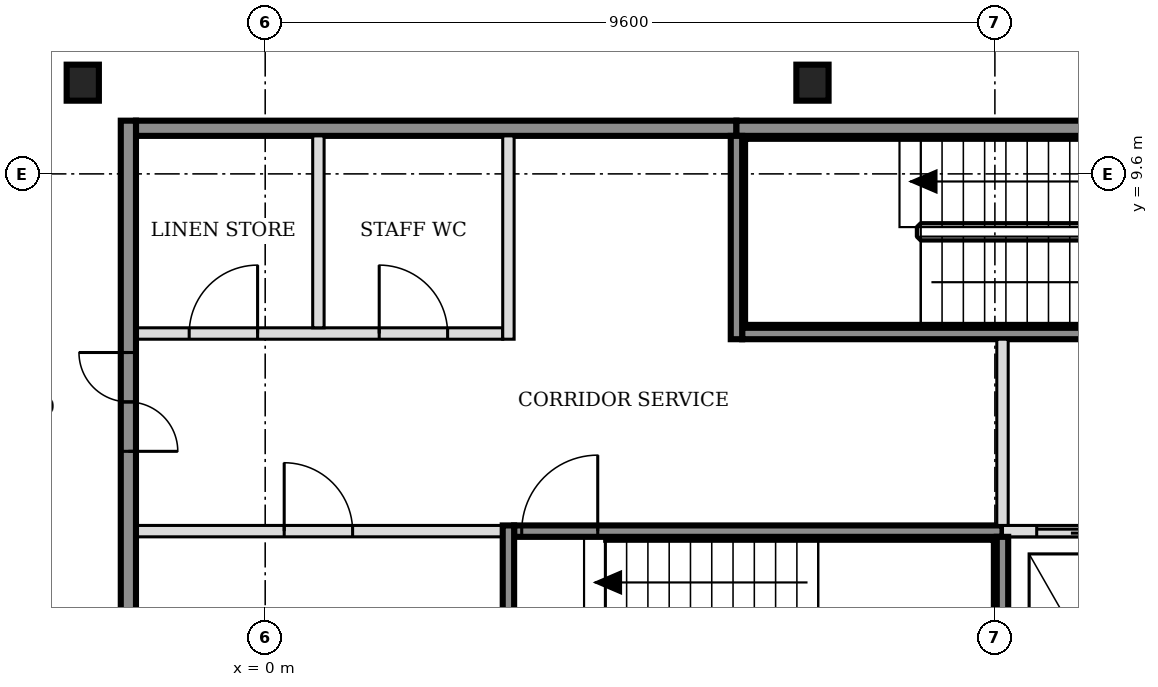
"""IFC4 building model, lengths in metres.
Left out: names, types, materials, properties, quantities, classifications, styles, units other than length and angle.
Written with IfcOpenShell. Run it as: python <this file> out.ifc"""

import sys

from ifc_helpers import new_model, si_unit, direction, frame, frame_2d, origin, origin_2d, place, context, subcontext, project, spatial, rectangle, i_section, extrude, element, fill, save


model = new_model("IFC4")
c1 = context("Model", 3, precision=1e-05, world=origin(), true_north=direction((0.0, 1.0)))
c2 = subcontext(c1, "Body", "Model", "MODEL_VIEW")
j1 = project(units=[si_unit("LENGTHUNIT", "METRE"), si_unit("PLANEANGLEUNIT", "RADIAN")], contexts=[c1])
p1 = place(None, origin())
s1 = spatial("IfcSite", under=j1, at=p1, CompositionType="ELEMENT")
p2 = place(p1, origin())
s2 = spatial("IfcBuilding", under=s1, at=p2, CompositionType="ELEMENT")
p3 = place(p2, frame((0.0, 0.0, 115.8)))
s3 = spatial("IfcBuildingStorey", under=s2, at=p3, CompositionType="ELEMENT", Elevation=115.8)
for number, where, z_axis, x_axis in (
    (1, (-2.4, 10.8, -0.15), (0.0, 0.0, 1.0), (1.0, 0.0, 0.0)),
    (2, (7.2, 10.8, -0.15), (0.0, 0.0, 1.0), (1.0, 0.0, 0.0)),
):
    element("IfcColumn", number, at=place(p3, frame(where, z_axis=z_axis, x_axis=x_axis)), inside=s3, PredefinedType="COLUMN", context=c2, shape_type="SweptSolid", body=[
        extrude(i_section(OverallWidth=0.424, OverallDepth=0.474, WebThickness=0.048, FlangeThickness=0.077, FilletRadius=0.015, at=origin_2d()), origin(), (0.0, 0.0, 1.0), 3.5),
    ])
p4 = place(p3, frame((-1.7, 4.9, 0.0), z_axis=(0.0, 0.0, 1.0), x_axis=(1.0, 0.0, 0.0)))
e3 = element("IfcWall", 3, at=p4, inside=s3, PredefinedType="PARTITIONING", context=c2, shape_type="SweptSolid", body=[
    extrude(rectangle(XDim=4.825, YDim=0.15, at=frame_2d((2.413, 0.0))), origin(), (0.0, 0.0, 1.0), 3.35),
])
p5 = place(p4, frame((1.95, 0.0, 0.0)))
e4 = element("IfcOpeningElement", 4, at=p5, cuts=e3, PredefinedType="OPENING", context=c2, shape_type="SweptSolid", body=[
    extrude(rectangle(XDim=0.9, YDim=2.1, at=frame_2d((0.45, 1.05))), frame((0.0, 0.085, 0.0), z_axis=(0.0, -1.0, 0.0), x_axis=(1.0, 0.0, 0.0)), (0.0, 0.0, 1.0), 0.17),
])
p6 = place(p3, frame((3.275, 4.9, 0.0), z_axis=(0.0, 0.0, 1.0), x_axis=(1.0, 0.0, 0.0)))
e5 = element("IfcWall", 5, at=p6, inside=s3, PredefinedType="SOLIDWALL", context=c2, shape_type="SweptSolid", body=[
    extrude(rectangle(XDim=6.425, YDim=0.15, at=frame_2d((3.212, 0.0))), origin(), (0.0, 0.0, 1.0), 3.35),
])
p7 = place(p6, frame((0.1, 0.0, 0.0)))
e6 = element("IfcOpeningElement", 6, at=p7, cuts=e5, PredefinedType="OPENING", context=c2, shape_type="SweptSolid", body=[
    extrude(rectangle(XDim=1.0, YDim=2.1, at=frame_2d((0.5, 1.05))), frame((0.0, 0.085, 0.0), z_axis=(0.0, -1.0, 0.0), x_axis=(1.0, 0.0, 0.0)), (0.0, 0.0, 1.0), 0.17),
])
p8 = place(p3, frame((9.7, 4.9, 0.0), z_axis=(0.0, 0.0, 1.0), x_axis=(1.0, 0.0, 0.0)))
e7 = element("IfcWall", 7, at=p8, inside=s3, PredefinedType="SOLIDWALL", context=c2, shape_type="SweptSolid", body=[
    extrude(rectangle(XDim=6.4, YDim=0.15, at=frame_2d((3.2, 0.0))), origin(), (0.0, 0.0, 1.0), 3.35),
])
p9 = place(p8, frame((0.45, 0.0, 0.0)))
e8 = element("IfcOpeningElement", 8, at=p9, cuts=e7, PredefinedType="OPENING", context=c2, shape_type="SweptSolid", body=[
    extrude(rectangle(XDim=1.0, YDim=2.1, at=frame_2d((0.5, 1.05))), frame((0.0, 0.085, 0.0), z_axis=(0.0, -1.0, 0.0), x_axis=(1.0, 0.0, 0.0)), (0.0, 0.0, 1.0), 0.17),
])
p10 = place(p8, frame((2.35, 0.0, 0.0)))
e9 = element("IfcOpeningElement", 9, at=p10, cuts=e7, PredefinedType="OPENING", context=c2, shape_type="SweptSolid", body=[
    extrude(rectangle(XDim=1.0, YDim=2.1, at=frame_2d((0.5, 1.05))), frame((0.0, 0.085, 0.0), z_axis=(0.0, -1.0, 0.0), x_axis=(1.0, 0.0, 0.0)), (0.0, 0.0, 1.0), 0.17),
])
p11 = place(p8, frame((4.7, 0.0, 0.0)))
e10 = element("IfcOpeningElement", 10, at=p11, cuts=e7, PredefinedType="OPENING", context=c2, shape_type="SweptSolid", body=[
    extrude(rectangle(XDim=0.9, YDim=2.1, at=frame_2d((0.45, 1.05))), frame((0.0, 0.085, 0.0), z_axis=(0.0, -1.0, 0.0), x_axis=(1.0, 0.0, 0.0)), (0.0, 0.0, 1.0), 0.17),
])
p12 = place(p3, frame((-1.7, 7.5, 0.0), z_axis=(0.0, 0.0, 1.0), x_axis=(1.0, 0.0, 0.0)))
e11 = element("IfcWall", 11, at=p12, inside=s3, PredefinedType="PARTITIONING", context=c2, shape_type="SweptSolid", body=[
    extrude(rectangle(XDim=4.825, YDim=0.15, at=frame_2d((2.413, 0.0))), origin(), (0.0, 0.0, 1.0), 3.35),
])
p13 = place(p12, frame((0.7, 0.0, 0.0)))
e12 = element("IfcOpeningElement", 12, at=p13, cuts=e11, PredefinedType="OPENING", context=c2, shape_type="SweptSolid", body=[
    extrude(rectangle(XDim=0.9, YDim=2.1, at=frame_2d((0.45, 1.05))), frame((0.0, 0.085, 0.0), z_axis=(0.0, -1.0, 0.0), x_axis=(1.0, 0.0, 0.0)), (0.0, 0.0, 1.0), 0.17),
])
p14 = place(p12, frame((3.2, 0.0, 0.0)))
e13 = element("IfcOpeningElement", 13, at=p14, cuts=e11, PredefinedType="OPENING", context=c2, shape_type="SweptSolid", body=[
    extrude(rectangle(XDim=0.9, YDim=2.1, at=frame_2d((0.45, 1.05))), frame((0.0, 0.085, 0.0), z_axis=(0.0, -1.0, 0.0), x_axis=(1.0, 0.0, 0.0)), (0.0, 0.0, 1.0), 0.17),
])
p15 = place(p3, frame((6.275, 7.5, 0.0), z_axis=(0.0, 0.0, 1.0), x_axis=(1.0, 0.0, 0.0)))
e14 = element("IfcWall", 14, at=p15, inside=s3, PredefinedType="SOLIDWALL", context=c2, shape_type="SweptSolid", body=[
    extrude(rectangle(XDim=6.425, YDim=0.15, at=frame_2d((3.212, 0.0))), origin(), (0.0, 0.0, 1.0), 3.35),
])
p16 = place(p15, frame((5.225, 0.0, 0.0)))
e15 = element("IfcOpeningElement", 15, at=p16, cuts=e14, PredefinedType="OPENING", context=c2, shape_type="SweptSolid", body=[
    extrude(rectangle(XDim=1.0, YDim=2.1, at=frame_2d((0.5, 1.05))), frame((0.0, 0.085, 0.0), z_axis=(0.0, -1.0, 0.0), x_axis=(1.0, 0.0, 0.0)), (0.0, 0.0, 1.0), 0.17),
])
p17 = place(p3, frame((-1.7, 10.2, 0.0), z_axis=(0.0, 0.0, 1.0), x_axis=(1.0, 0.0, 0.0)))
e16 = element("IfcWall", 16, at=p17, inside=s3, PredefinedType="SOLIDWALL", context=c2, shape_type="SweptSolid", body=[
    extrude(rectangle(XDim=7.9, YDim=0.2, at=frame_2d((3.95, 0.0))), origin(), (0.0, 0.0, 1.0), 3.35),
])
p18 = place(p3, frame((6.2, 10.2, 0.0), z_axis=(0.0, 0.0, 1.0), x_axis=(1.0, 0.0, 0.0)))
e17 = element("IfcWall", 17, at=p18, inside=s3, PredefinedType="SOLIDWALL", context=c2, shape_type="SweptSolid", body=[
    extrude(rectangle(XDim=6.5, YDim=0.2, at=frame_2d((3.25, 0.0))), origin(), (0.0, 0.0, 1.0), 3.35),
])
p19 = place(p3, frame((-1.8, -5.5, 0.0), z_axis=(0.0, 0.0, 1.0), x_axis=(0.0, 1.0, 0.0)))
e18 = element("IfcWall", 18, at=p19, inside=s3, PredefinedType="SOLIDWALL", context=c2, shape_type="SweptSolid", body=[
    extrude(rectangle(XDim=15.8, YDim=0.2, at=frame_2d((7.9, 0.0))), origin(), (0.0, 0.0, 1.0), 3.35),
])
p20 = place(p19, frame((3.05, 0.0, 0.0)))
e19 = element("IfcOpeningElement", 19, at=p20, cuts=e18, PredefinedType="OPENING", context=c2, shape_type="SweptSolid", body=[
    extrude(rectangle(XDim=1.3, YDim=2.1, at=frame_2d((0.65, 1.05))), frame((0.0, 0.11, 0.0), z_axis=(0.0, -1.0, 0.0), x_axis=(1.0, 0.0, 0.0)), (0.0, 0.0, 1.0), 0.22),
])
p21 = place(p19, frame((11.45, 0.0, 0.0)))
e20 = element("IfcOpeningElement", 20, at=p21, cuts=e18, PredefinedType="OPENING", context=c2, shape_type="SweptSolid", body=[
    extrude(rectangle(XDim=1.3, YDim=2.1, at=frame_2d((0.65, 1.05))), frame((0.0, 0.11, 0.0), z_axis=(0.0, -1.0, 0.0), x_axis=(1.0, 0.0, 0.0)), (0.0, 0.0, 1.0), 0.22),
])
p22 = place(p3, frame((0.7, 7.575, 0.0), z_axis=(0.0, 0.0, 1.0), x_axis=(0.0, 1.0, 0.0)))
e21 = element("IfcWall", 21, at=p22, inside=s3, PredefinedType="PARTITIONING", context=c2, shape_type="SweptSolid", body=[
    extrude(rectangle(XDim=2.525, YDim=0.15, at=frame_2d((1.263, 0.0))), origin(), (0.0, 0.0, 1.0), 3.35),
])
p23 = place(p3, frame((3.2, 2.275, 0.0), z_axis=(0.0, 0.0, 1.0), x_axis=(0.0, 1.0, 0.0)))
e22 = element("IfcWall", 22, at=p23, inside=s3, PredefinedType="SOLIDWALL", context=c2, shape_type="SweptSolid", body=[
    extrude(rectangle(XDim=2.7, YDim=0.15, at=frame_2d((1.35, 0.0))), origin(), (0.0, 0.0, 1.0), 3.35),
])
p24 = place(p3, frame((3.2, 7.425, 0.0), z_axis=(0.0, 0.0, 1.0), x_axis=(0.0, 1.0, 0.0)))
e23 = element("IfcWall", 23, at=p24, inside=s3, PredefinedType="PARTITIONING", context=c2, shape_type="SweptSolid", body=[
    extrude(rectangle(XDim=2.675, YDim=0.15, at=frame_2d((1.337, 0.0))), origin(), (0.0, 0.0, 1.0), 3.35),
])
p25 = place(p3, frame((6.2, 7.425, 0.0), z_axis=(0.0, 0.0, 1.0), x_axis=(0.0, 1.0, 0.0)))
e24 = element("IfcWall", 24, at=p25, inside=s3, PredefinedType="SOLIDWALL", context=c2, shape_type="SweptSolid", body=[
    extrude(rectangle(XDim=2.675, YDim=0.15, at=frame_2d((1.337, 0.0))), origin(), (0.0, 0.0, 1.0), 3.35),
])
p26 = place(p3, frame((9.7, 2.275, 0.0), z_axis=(0.0, 0.0, 1.0), x_axis=(0.0, 1.0, 0.0)))
e25 = element("IfcWall", 25, at=p26, inside=s3, PredefinedType="SOLIDWALL", context=c2, shape_type="SweptSolid", body=[
    extrude(rectangle(XDim=2.55, YDim=0.15, at=frame_2d((1.275, 0.0))), origin(), (0.0, 0.0, 1.0), 3.35),
])
p27 = place(p3, frame((9.7, 4.975, 0.0), z_axis=(0.0, 0.0, 1.0), x_axis=(0.0, 1.0, 0.0)))
e26 = element("IfcWall", 26, at=p27, inside=s3, PredefinedType="SOLIDWALL", context=c2, shape_type="SweptSolid", body=[
    extrude(rectangle(XDim=2.45, YDim=0.15, at=frame_2d((1.225, 0.0))), origin(), (0.0, 0.0, 1.0), 3.35),
])
p28 = place(p9, origin())
e27 = element("IfcDoor", 27, at=p28, inside=s3, OperationType="DOUBLE_DOOR_SLIDING", PredefinedType="DOOR", context=c2, shape_type="SweptSolid", body=[
    extrude(rectangle(XDim=1.0, YDim=2.1, at=frame_2d((0.5, 1.05))), frame((0.0, 0.025, 0.0), z_axis=(0.0, -1.0, 0.0), x_axis=(1.0, 0.0, 0.0)), (0.0, 0.0, 1.0), 0.05),
])
fill(e8, e27)
p29 = place(p7, origin())
e28 = element("IfcDoor", 28, at=p29, inside=s3, OperationType="SINGLE_SWING_RIGHT", PredefinedType="DOOR", context=c2, shape_type="SweptSolid", body=[
    extrude(rectangle(XDim=1.0, YDim=2.1, at=frame_2d((0.5, 1.05))), frame((0.0, 0.025, 0.0), z_axis=(0.0, -1.0, 0.0), x_axis=(1.0, 0.0, 0.0)), (0.0, 0.0, 1.0), 0.05),
])
fill(e6, e28)
p30 = place(p21, origin())
e29 = element("IfcDoor", 29, at=p30, inside=s3, OperationType="DOUBLE_DOOR_SINGLE_SWING", PredefinedType="DOOR", context=c2, shape_type="SweptSolid", body=[
    extrude(rectangle(XDim=1.3, YDim=2.1, at=frame_2d((0.65, 1.05))), frame((0.0, 0.025, 0.0), z_axis=(0.0, -1.0, 0.0), x_axis=(1.0, 0.0, 0.0)), (0.0, 0.0, 1.0), 0.05),
])
fill(e20, e29)
p31 = place(p5, origin())
e30 = element("IfcDoor", 30, at=p31, inside=s3, OperationType="SINGLE_SWING_LEFT", PredefinedType="DOOR", context=c2, shape_type="SweptSolid", body=[
    extrude(rectangle(XDim=0.9, YDim=2.1, at=frame_2d((0.45, 1.05))), frame((0.0, 0.025, 0.0), z_axis=(0.0, -1.0, 0.0), x_axis=(1.0, 0.0, 0.0)), (0.0, 0.0, 1.0), 0.05),
])
fill(e4, e30)
p32 = place(p13, origin())
e31 = element("IfcDoor", 31, at=p32, inside=s3, OperationType="SINGLE_SWING_RIGHT", PredefinedType="DOOR", context=c2, shape_type="SweptSolid", body=[
    extrude(rectangle(XDim=0.9, YDim=2.1, at=frame_2d((0.45, 1.05))), frame((0.0, 0.025, 0.0), z_axis=(0.0, -1.0, 0.0), x_axis=(1.0, 0.0, 0.0)), (0.0, 0.0, 1.0), 0.05),
])
fill(e12, e31)
p33 = place(p14, origin())
e32 = element("IfcDoor", 32, at=p33, inside=s3, OperationType="SINGLE_SWING_LEFT", PredefinedType="DOOR", context=c2, shape_type="SweptSolid", body=[
    extrude(rectangle(XDim=0.9, YDim=2.1, at=frame_2d((0.45, 1.05))), frame((0.0, 0.025, 0.0), z_axis=(0.0, -1.0, 0.0), x_axis=(1.0, 0.0, 0.0)), (0.0, 0.0, 1.0), 0.05),
])
fill(e13, e32)
save(model, sys.argv[1])
